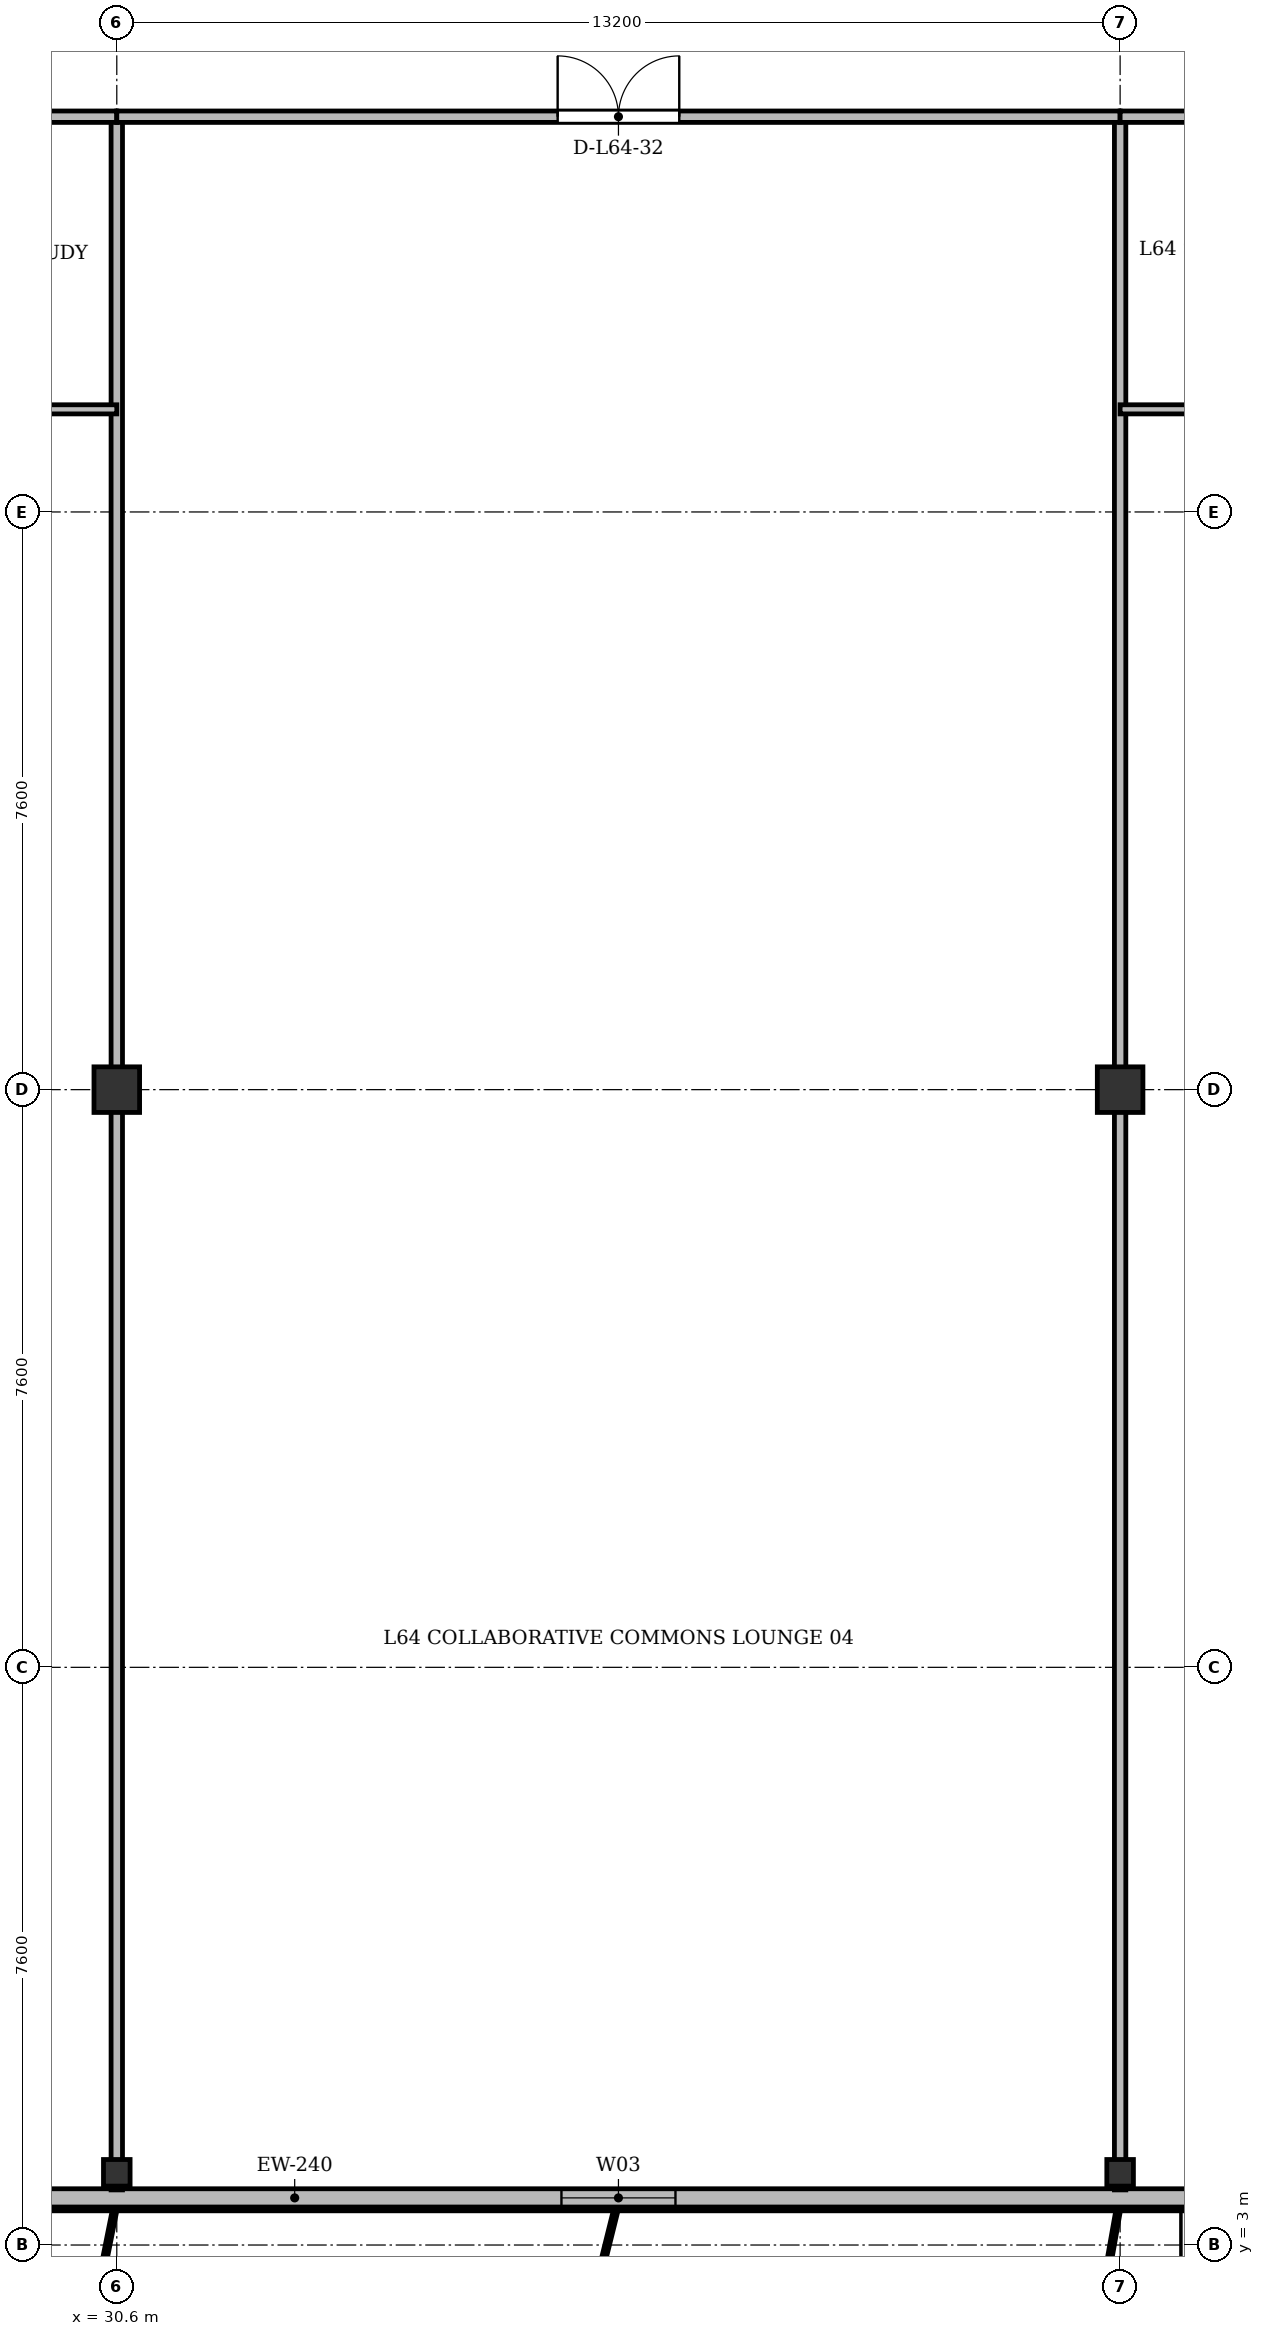
"""IFC4 building model, lengths in metres.
Left out: names, types, materials, properties, quantities, classifications, styles, units other than length and angle.
Written with IfcOpenShell. Run it as: python <this file> out.ifc"""

import sys

from ifc_helpers import new_model, si_unit, direction, frame, frame_2d, origin, origin_2d, place, context, subcontext, project, spatial, rectangle, i_section, extrude, source, transform, mapped, element, fill, save


model = new_model("IFC4")
c1 = context("Model", 3, precision=1e-05, world=origin(), true_north=direction((0.0, 1.0)))
c2 = subcontext(c1, "Body", "Model", "MODEL_VIEW")
j1 = project(units=[si_unit("LENGTHUNIT", "METRE"), si_unit("PLANEANGLEUNIT", "RADIAN")], contexts=[c1])
p1 = place(None, origin())
s1 = spatial("IfcSite", under=j1, at=p1, CompositionType="ELEMENT")
p2 = place(p1, origin())
s2 = spatial("IfcBuilding", under=s1, at=p2, CompositionType="ELEMENT")
p3 = place(p2, frame((0.0, 0.0, 248.7)))
s3 = spatial("IfcBuildingStorey", under=s2, at=p3, CompositionType="ELEMENT", Elevation=248.7)
m1 = source(origin(), c2, "Body", "SweptSolid", [
    extrude(i_section(OverallWidth=0.35, OverallDepth=0.35, WebThickness=0.018, FlangeThickness=0.028, at=origin_2d()), origin(), (0.0, 0.0, 1.0), 3.6),
])
p4 = place(p3, frame((30.6, 3.95, 0.0), z_axis=(0.0, 0.0, 1.0), x_axis=(1.0, 0.0, 0.0)))
e1 = element("IfcColumn", 1, at=p4, inside=s3, PredefinedType="COLUMN", context=c2, shape_type="MappedRepresentation", body=[
    mapped(m1, transform((0.0, 0.0, 0.0), x_axis=(1.0, 0.0, 0.0), y_axis=(0.0, 1.0, 0.0), z_axis=(0.0, 0.0, 1.0), scale=1.0)),
])
m2 = source(origin(), c2, "Body", "SweptSolid", [
    extrude(rectangle(XDim=0.6, YDim=0.6, at=origin_2d()), origin(), (0.0, 0.0, 1.0), 3.6),
])
p5 = place(p3, frame((30.6, 18.2, 0.0), z_axis=(0.0, 0.0, 1.0), x_axis=(1.0, 0.0, 0.0)))
e2 = element("IfcColumn", 2, at=p5, inside=s3, PredefinedType="COLUMN", context=c2, shape_type="MappedRepresentation", body=[
    mapped(m2, transform((0.0, 0.0, 0.0), x_axis=(1.0, 0.0, 0.0), y_axis=(0.0, 1.0, 0.0), z_axis=(0.0, 0.0, 1.0), scale=1.0)),
])
p6 = place(p3, frame((43.8, 3.95, 0.0), z_axis=(0.0, 0.0, 1.0), x_axis=(1.0, 0.0, 0.0)))
e3 = element("IfcColumn", 3, at=p6, inside=s3, PredefinedType="COLUMN", context=c2, shape_type="MappedRepresentation", body=[
    mapped(m1, transform((0.0, 0.0, 0.0), x_axis=(1.0, 0.0, 0.0), y_axis=(0.0, 1.0, 0.0), z_axis=(0.0, 0.0, 1.0), scale=1.0)),
])
p7 = place(p3, frame((43.8, 18.2, 0.0), z_axis=(0.0, 0.0, 1.0), x_axis=(1.0, 0.0, 0.0)))
e4 = element("IfcColumn", 4, at=p7, inside=s3, PredefinedType="COLUMN", context=c2, shape_type="MappedRepresentation", body=[
    mapped(m2, transform((0.0, 0.0, 0.0), x_axis=(1.0, 0.0, 0.0), y_axis=(0.0, 1.0, 0.0), z_axis=(0.0, 0.0, 1.0), scale=1.0)),
])
p8 = place(p3, frame((63.2, 3.62, 0.0), z_axis=(0.0, 0.0, 1.0), x_axis=(-1.0, 0.0, 0.0)))
e5 = element("IfcWall", 5, at=p8, inside=s3, PredefinedType="SOLIDWALL", context=c2, shape_type="SweptSolid", body=[
    extrude(rectangle(XDim=52.0, YDim=0.24, at=frame_2d((26.0, 0.0))), origin(), (0.0, 0.0, 1.0), 3.37),
])
p9 = place(p8, frame((1.42, 0.0, 0.9)))
e6 = element("IfcOpeningElement", 6, at=p9, cuts=e5, PredefinedType="OPENING", context=c2, shape_type="SweptSolid", body=[
    extrude(rectangle(XDim=1.65, YDim=1.85, at=frame_2d((0.825, 0.925))), frame((0.0, 0.13, 0.0), z_axis=(0.0, -1.0, 0.0), x_axis=(1.0, 0.0, 0.0)), (0.0, 0.0, 1.0), 0.26),
])
p10 = place(p8, frame((7.4, 0.0, 0.9)))
e7 = element("IfcOpeningElement", 7, at=p10, cuts=e5, PredefinedType="OPENING", context=c2, shape_type="SweptSolid", body=[
    extrude(rectangle(XDim=1.8, YDim=1.8, at=frame_2d((0.9, 0.9))), frame((0.0, 0.13, 0.0), z_axis=(0.0, -1.0, 0.0), x_axis=(1.0, 0.0, 0.0)), (0.0, 0.0, 1.0), 0.26),
])
p11 = place(p8, frame((14.017, 0.0, 0.0)))
e8 = element("IfcOpeningElement", 8, at=p11, cuts=e5, PredefinedType="OPENING", context=c2, shape_type="SweptSolid", body=[
    extrude(rectangle(XDim=1.2, YDim=2.2, at=frame_2d((0.6, 1.1))), frame((0.0, 0.13, 0.0), z_axis=(0.0, -1.0, 0.0), x_axis=(1.0, 0.0, 0.0)), (0.0, 0.0, 1.0), 0.26),
])
p12 = place(p8, frame((25.25, 0.0, 0.9)))
e9 = element("IfcOpeningElement", 9, at=p12, cuts=e5, PredefinedType="OPENING", context=c2, shape_type="SweptSolid", body=[
    extrude(rectangle(XDim=1.5, YDim=1.75, at=frame_2d((0.75, 0.875))), frame((0.0, 0.13, 0.0), z_axis=(0.0, -1.0, 0.0), x_axis=(1.0, 0.0, 0.0)), (0.0, 0.0, 1.0), 0.26),
])
p13 = place(p8, frame((35.2, 0.0, 0.9)))
e10 = element("IfcOpeningElement", 10, at=p13, cuts=e5, PredefinedType="OPENING", context=c2, shape_type="SweptSolid", body=[
    extrude(rectangle(XDim=2.0, YDim=1.95, at=frame_2d((1.0, 0.975))), frame((0.0, 0.13, 0.0), z_axis=(0.0, -1.0, 0.0), x_axis=(1.0, 0.0, 0.0)), (0.0, 0.0, 1.0), 0.26),
])
p14 = place(p8, frame((45.302, 0.0, 0.0)))
e11 = element("IfcOpeningElement", 11, at=p14, cuts=e5, PredefinedType="OPENING", context=c2, shape_type="SweptSolid", body=[
    extrude(rectangle(XDim=1.2, YDim=2.2, at=frame_2d((0.6, 1.1))), frame((0.0, 0.13, 0.0), z_axis=(0.0, -1.0, 0.0), x_axis=(1.0, 0.0, 0.0)), (0.0, 0.0, 1.0), 0.26),
])
p15 = place(p8, frame((48.855, 0.0, 0.9)))
e12 = element("IfcOpeningElement", 12, at=p15, cuts=e5, PredefinedType="OPENING", context=c2, shape_type="SweptSolid", body=[
    extrude(rectangle(XDim=1.8, YDim=1.8, at=frame_2d((0.9, 0.9))), frame((0.0, 0.13, 0.0), z_axis=(0.0, -1.0, 0.0), x_axis=(1.0, 0.0, 0.0)), (0.0, 0.0, 1.0), 0.26),
])
for number, where, z_axis, x_axis in (
    (13, (30.6, 3.725, 0.0), (0.0, 0.0, 1.0), (0.0, 1.0, 0.0)),
    (14, (43.8, 3.725, 0.0), (0.0, 0.0, 1.0), (0.0, 1.0, 0.0)),
):
    element("IfcWall", number, at=place(p3, frame(where, z_axis=z_axis, x_axis=x_axis)), inside=s3, PredefinedType="PARTITIONING", context=c2, shape_type="SweptSolid", body=[
        extrude(rectangle(XDim=27.275, YDim=0.15, at=frame_2d((13.637, 0.0))), origin(), (0.0, 0.0, 1.0), 2.87),
    ])
p16 = place(p3, frame((23.4, 31.0, 0.0), z_axis=(0.0, 0.0, 1.0), x_axis=(1.0, 0.0, 0.0)))
e15 = element("IfcWall", 15, at=p16, inside=s3, PredefinedType="PARTITIONING", context=c2, shape_type="SweptSolid", body=[
    extrude(rectangle(XDim=7.2, YDim=0.15, at=frame_2d((3.6, 0.0))), origin(), (0.0, 0.0, 1.0), 2.87),
])
p17 = place(p16, frame((3.125, 0.0, 0.0)))
e16 = element("IfcOpeningElement", 16, at=p17, cuts=e15, PredefinedType="OPENING", context=c2, shape_type="SweptSolid", body=[
    extrude(rectangle(XDim=0.95, YDim=2.15, at=frame_2d((0.475, 1.075))), frame((0.0, 0.085, 0.0), z_axis=(0.0, -1.0, 0.0), x_axis=(1.0, 0.0, 0.0)), (0.0, 0.0, 1.0), 0.17),
])
p18 = place(p3, frame((23.4, 27.15, 0.0), z_axis=(0.0, 0.0, 1.0), x_axis=(1.0, 0.0, 0.0)))
e17 = element("IfcWall", 17, at=p18, inside=s3, PredefinedType="PARTITIONING", context=c2, shape_type="SweptSolid", body=[
    extrude(rectangle(XDim=7.2, YDim=0.12, at=frame_2d((3.6, 0.0))), origin(), (0.0, 0.0, 1.0), 2.87),
])
p19 = place(p18, frame((3.125, 0.0, 0.0)))
e18 = element("IfcOpeningElement", 18, at=p19, cuts=e17, PredefinedType="OPENING", context=c2, shape_type="SweptSolid", body=[
    extrude(rectangle(XDim=0.95, YDim=2.15, at=frame_2d((0.475, 1.075))), frame((0.0, 0.07, 0.0), z_axis=(0.0, -1.0, 0.0), x_axis=(1.0, 0.0, 0.0)), (0.0, 0.0, 1.0), 0.14),
])
p20 = place(p3, frame((30.6, 31.0, 0.0), z_axis=(0.0, 0.0, 1.0), x_axis=(1.0, 0.0, 0.0)))
e19 = element("IfcWall", 19, at=p20, inside=s3, PredefinedType="PARTITIONING", context=c2, shape_type="SweptSolid", body=[
    extrude(rectangle(XDim=13.2, YDim=0.15, at=frame_2d((6.6, 0.0))), origin(), (0.0, 0.0, 1.0), 2.87),
])
p21 = place(p20, frame((5.8, 0.0, 0.0)))
e20 = element("IfcOpeningElement", 20, at=p21, cuts=e19, PredefinedType="OPENING", context=c2, shape_type="SweptSolid", body=[
    extrude(rectangle(XDim=1.6, YDim=2.2, at=frame_2d((0.8, 1.1))), frame((0.0, 0.085, 0.0), z_axis=(0.0, -1.0, 0.0), x_axis=(1.0, 0.0, 0.0)), (0.0, 0.0, 1.0), 0.17),
])
p22 = place(p3, frame((43.8, 31.0, 0.0), z_axis=(0.0, 0.0, 1.0), x_axis=(1.0, 0.0, 0.0)))
e21 = element("IfcWall", 21, at=p22, inside=s3, PredefinedType="PARTITIONING", context=c2, shape_type="SweptSolid", body=[
    extrude(rectangle(XDim=7.2, YDim=0.15, at=frame_2d((3.6, 0.0))), origin(), (0.0, 0.0, 1.0), 2.87),
])
p23 = place(p22, frame((3.125, 0.0, 0.0)))
e22 = element("IfcOpeningElement", 22, at=p23, cuts=e21, PredefinedType="OPENING", context=c2, shape_type="SweptSolid", body=[
    extrude(rectangle(XDim=0.95, YDim=2.15, at=frame_2d((0.475, 1.075))), frame((0.0, 0.085, 0.0), z_axis=(0.0, -1.0, 0.0), x_axis=(1.0, 0.0, 0.0)), (0.0, 0.0, 1.0), 0.17),
])
p24 = place(p3, frame((43.8, 27.15, 0.0), z_axis=(0.0, 0.0, 1.0), x_axis=(1.0, 0.0, 0.0)))
e23 = element("IfcWall", 23, at=p24, inside=s3, PredefinedType="PARTITIONING", context=c2, shape_type="SweptSolid", body=[
    extrude(rectangle(XDim=7.2, YDim=0.12, at=frame_2d((3.6, 0.0))), origin(), (0.0, 0.0, 1.0), 2.87),
])
p25 = place(p24, frame((3.125, 0.0, 0.0)))
e24 = element("IfcOpeningElement", 24, at=p25, cuts=e23, PredefinedType="OPENING", context=c2, shape_type="SweptSolid", body=[
    extrude(rectangle(XDim=0.95, YDim=2.15, at=frame_2d((0.475, 1.075))), frame((0.0, 0.07, 0.0), z_axis=(0.0, -1.0, 0.0), x_axis=(1.0, 0.0, 0.0)), (0.0, 0.0, 1.0), 0.14),
])
m3 = source(origin(), c2, "Body", "SweptSolid", [
    extrude(rectangle(XDim=1.5, YDim=1.75, at=frame_2d((0.75, 0.875))), frame((0.0, 0.03, 0.0), z_axis=(0.0, -1.0, 0.0), x_axis=(1.0, 0.0, 0.0)), (0.0, 0.0, 1.0), 0.06),
])
p26 = place(p12, origin())
e25 = element("IfcWindow", 25, at=p26, inside=s3, PartitioningType="SINGLE_PANEL", PredefinedType="WINDOW", context=c2, shape_type="MappedRepresentation", body=[
    mapped(m3, transform((0.0, 0.0, 0.0), x_axis=(1.0, 0.0, 0.0), y_axis=(0.0, 1.0, 0.0), z_axis=(0.0, 0.0, 1.0), scale=1.0)),
])
fill(e9, e25)
m4 = source(origin(), c2, "Body", "SweptSolid", [
    extrude(rectangle(XDim=1.6, YDim=2.2, at=frame_2d((0.8, 1.1))), frame((0.0, 0.025, 0.0), z_axis=(0.0, -1.0, 0.0), x_axis=(1.0, 0.0, 0.0)), (0.0, 0.0, 1.0), 0.05),
])
p27 = place(p21, origin())
e26 = element("IfcDoor", 26, at=p27, inside=s3, OperationType="DOUBLE_DOOR_SINGLE_SWING", PredefinedType="DOOR", context=c2, shape_type="MappedRepresentation", body=[
    mapped(m4, transform((0.0, 0.0, 0.0), x_axis=(1.0, 0.0, 0.0), y_axis=(0.0, 1.0, 0.0), z_axis=(0.0, 0.0, 1.0), scale=1.0)),
])
fill(e20, e26)
save(model, sys.argv[1])
